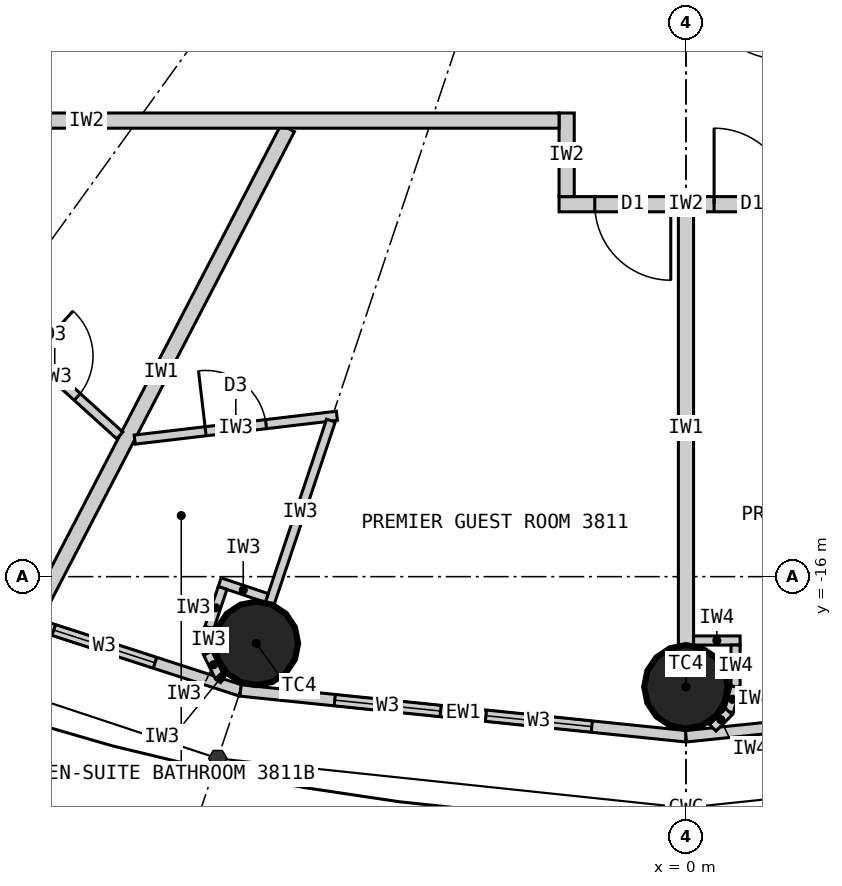
"""IFC4 building model, lengths in metres.
Left out: names, types, materials, properties, quantities, classifications, styles, units other than length and angle.
Written with IfcOpenShell. Run it as: python <this file> out.ifc"""

import sys

from ifc_helpers import new_model, si_unit, direction, frame, frame_2d, origin, origin_2d, place, context, subcontext, project, spatial, rectangle, circle, extrude, element, fill, save


model = new_model("IFC4")
c1 = context("Model", 3, precision=1e-05, world=origin(), true_north=direction((0.0, 1.0)))
c2 = subcontext(c1, "Body", "Model", "MODEL_VIEW")
j1 = project(units=[si_unit("LENGTHUNIT", "METRE"), si_unit("PLANEANGLEUNIT", "RADIAN")], contexts=[c1])
p1 = place(None, origin())
s1 = spatial("IfcSite", under=j1, at=p1, CompositionType="ELEMENT")
p2 = place(p1, origin())
s2 = spatial("IfcBuilding", under=s1, at=p2, CompositionType="ELEMENT")
p3 = place(p2, frame((0.0, 0.0, 146.7)))
s3 = spatial("IfcBuildingStorey", under=s2, at=p3, CompositionType="ELEMENT", Elevation=146.7)
for number, where, z_axis, x_axis in (
    (1, (-5.653, -16.877, 0.0), (0.0, 0.0, 1.0), (1.0, 0.0, 0.0)),
    (2, (0.0, -17.45, 0.0), (0.0, 0.0, 1.0), (1.0, 0.0, 0.0)),
):
    element("IfcColumn", number, at=place(p3, frame(where, z_axis=z_axis, x_axis=x_axis)), inside=s3, PredefinedType="COLUMN", context=c2, shape_type="SweptSolid", body=[
        extrude(circle(Radius=0.55, at=origin_2d()), origin(), (0.0, 0.0, 1.0), 3.3),
    ])
p4 = place(p3, frame((-11.346, -15.722, 0.0), z_axis=(0.0, 0.0, 1.0), x_axis=(0.951432482129, -0.307857486429, 0.0)))
e3 = element("IfcWall", 3, at=p4, inside=s3, PredefinedType="ELEMENTEDWALL", context=c2, shape_type="SweptSolid", body=[
    extrude(rectangle(XDim=5.766, YDim=0.15, at=frame_2d((2.883, 0.0))), origin(), (0.0, 0.0, 1.0), 3.12),
])
p5 = place(p4, frame((1.183, 0.0, 0.9)))
e4 = element("IfcOpeningElement", 4, at=p5, cuts=e3, PredefinedType="OPENING", context=c2, shape_type="SweptSolid", body=[
    extrude(rectangle(XDim=1.4, YDim=1.9, at=frame_2d((0.7, 0.95))), frame((0.0, 0.085, 0.0), z_axis=(0.0, -1.0, 0.0), x_axis=(1.0, 0.0, 0.0)), (0.0, 0.0, 1.0), 0.17),
])
p6 = place(p4, frame((3.183, 0.0, 0.9)))
e5 = element("IfcOpeningElement", 5, at=p6, cuts=e3, PredefinedType="OPENING", context=c2, shape_type="SweptSolid", body=[
    extrude(rectangle(XDim=1.4, YDim=1.9, at=frame_2d((0.7, 0.95))), frame((0.0, 0.085, 0.0), z_axis=(0.0, -1.0, 0.0), x_axis=(1.0, 0.0, 0.0)), (0.0, 0.0, 1.0), 0.17),
])
p7 = place(p3, frame((-5.86, -17.497, 0.0), z_axis=(0.0, 0.0, 1.0), x_axis=(0.994751738032, -0.102318032045, 0.0)))
e6 = element("IfcWall", 6, at=p7, inside=s3, PredefinedType="ELEMENTEDWALL", context=c2, shape_type="SweptSolid", body=[
    extrude(rectangle(XDim=5.891, YDim=0.15, at=frame_2d((2.946, 0.0))), origin(), (0.0, 0.0, 1.0), 3.12),
])
p8 = place(p7, frame((1.246, 0.0, 0.9)))
e7 = element("IfcOpeningElement", 7, at=p8, cuts=e6, PredefinedType="OPENING", context=c2, shape_type="SweptSolid", body=[
    extrude(rectangle(XDim=1.4, YDim=1.9, at=frame_2d((0.7, 0.95))), frame((0.0, 0.085, 0.0), z_axis=(0.0, -1.0, 0.0), x_axis=(1.0, 0.0, 0.0)), (0.0, 0.0, 1.0), 0.17),
])
p9 = place(p7, frame((3.246, 0.0, 0.9)))
e8 = element("IfcOpeningElement", 8, at=p9, cuts=e6, PredefinedType="OPENING", context=c2, shape_type="SweptSolid", body=[
    extrude(rectangle(XDim=1.4, YDim=1.9, at=frame_2d((0.7, 0.95))), frame((0.0, 0.085, 0.0), z_axis=(0.0, -1.0, 0.0), x_axis=(1.0, 0.0, 0.0)), (0.0, 0.0, 1.0), 0.17),
])
p10 = place(p3, frame((0.0, -18.1, 0.0), z_axis=(0.0, 0.0, 1.0), x_axis=(0.994751738032, 0.102318032045, 0.0)))
e9 = element("IfcWall", 9, at=p10, inside=s3, PredefinedType="ELEMENTEDWALL", context=c2, shape_type="SweptSolid", body=[
    extrude(rectangle(XDim=5.891, YDim=0.15, at=frame_2d((2.946, 0.0))), origin(), (0.0, 0.0, 1.0), 3.12),
])
p11 = place(p10, frame((1.246, 0.0, 0.9)))
e10 = element("IfcOpeningElement", 10, at=p11, cuts=e9, PredefinedType="OPENING", context=c2, shape_type="SweptSolid", body=[
    extrude(rectangle(XDim=1.4, YDim=1.9, at=frame_2d((0.7, 0.95))), frame((0.0, 0.085, 0.0), z_axis=(0.0, -1.0, 0.0), x_axis=(1.0, 0.0, 0.0)), (0.0, 0.0, 1.0), 0.17),
])
p12 = place(p10, frame((3.246, 0.0, 0.9)))
e11 = element("IfcOpeningElement", 11, at=p12, cuts=e9, PredefinedType="OPENING", context=c2, shape_type="SweptSolid", body=[
    extrude(rectangle(XDim=1.4, YDim=1.9, at=frame_2d((0.7, 0.95))), frame((0.0, 0.085, 0.0), z_axis=(0.0, -1.0, 0.0), x_axis=(1.0, 0.0, 0.0)), (0.0, 0.0, 1.0), 0.17),
])
p13 = place(p3, frame((-5.24, -10.1, 0.0), z_axis=(0.0, 0.0, 1.0), x_axis=(-0.460532965373, -0.887642601391, 0.0)))
e12 = element("IfcWall", 12, at=p13, inside=s3, PredefinedType="PARTITIONING", context=c2, shape_type="SweptSolid", body=[
    extrude(rectangle(XDim=7.231, YDim=0.2, at=frame_2d((3.616, 0.0))), origin(), (0.0, 0.0, 1.0), 3.12),
])
p14 = place(p3, frame((0.0, -11.2, 0.0), z_axis=(0.0, 0.0, 1.0), x_axis=(0.0, -1.0, 0.0)))
e13 = element("IfcWall", 13, at=p14, inside=s3, PredefinedType="PARTITIONING", context=c2, shape_type="SweptSolid", body=[
    extrude(rectangle(XDim=5.7, YDim=0.2, at=frame_2d((2.85, 0.0))), origin(), (0.0, 0.0, 1.0), 2.42),
])
p15 = place(p3, frame((1.67, -11.1, 0.0), z_axis=(0.0, 0.0, 1.0), x_axis=(-1.0, 0.0, 0.0)))
e14 = element("IfcWall", 14, at=p15, inside=s3, PredefinedType="PARTITIONING", context=c2, shape_type="SweptSolid", body=[
    extrude(rectangle(XDim=3.34, YDim=0.2, at=frame_2d((1.67, 0.0))), origin(), (0.0, 0.0, 1.0), 3.12),
])
p16 = place(p15, frame((1.87, 0.0, 0.0)))
e15 = element("IfcOpeningElement", 15, at=p16, cuts=e14, PredefinedType="OPENING", context=c2, shape_type="SweptSolid", body=[
    extrude(rectangle(XDim=1.0, YDim=2.2, at=frame_2d((0.5, 1.1))), frame((0.0, 0.11, 0.0), z_axis=(0.0, -1.0, 0.0), x_axis=(1.0, 0.0, 0.0)), (0.0, 0.0, 1.0), 0.22),
])
p17 = place(p15, frame((0.3, 0.0, 0.0)))
e16 = element("IfcOpeningElement", 16, at=p17, cuts=e14, PredefinedType="OPENING", context=c2, shape_type="SweptSolid", body=[
    extrude(rectangle(XDim=1.0, YDim=2.2, at=frame_2d((0.5, 1.1))), frame((0.0, 0.11, 0.0), z_axis=(0.0, -1.0, 0.0), x_axis=(1.0, 0.0, 0.0)), (0.0, 0.0, 1.0), 0.22),
])
p18 = place(p3, frame((-1.57, -9.9, 0.0), z_axis=(0.0, 0.0, 1.0), x_axis=(0.0, -1.0, 0.0)))
e17 = element("IfcWall", 17, at=p18, inside=s3, PredefinedType="PARTITIONING", context=c2, shape_type="SweptSolid", body=[
    extrude(rectangle(XDim=1.1, YDim=0.2, at=frame_2d((0.55, 0.0))), origin(), (0.0, 0.0, 1.0), 3.12),
])
p19 = place(p3, frame((-7.45, -14.142, 0.0), z_axis=(0.0, 0.0, 1.0), x_axis=(-0.74113984586, 0.671350675041, 0.0)))
e18 = element("IfcWall", 18, at=p19, inside=s3, PredefinedType="PARTITIONING", context=c2, shape_type="SweptSolid", body=[
    extrude(rectangle(XDim=2.309, YDim=0.12, at=frame_2d((1.154, 0.0))), origin(), (0.0, 0.0, 1.0), 3.12),
])
p20 = place(p19, frame((0.754, 0.0, 0.0)))
e19 = element("IfcOpeningElement", 19, at=p20, cuts=e18, PredefinedType="OPENING", context=c2, shape_type="SweptSolid", body=[
    extrude(rectangle(XDim=0.8, YDim=2.1, at=frame_2d((0.4, 1.05))), frame((0.0, 0.07, 0.0), z_axis=(0.0, -1.0, 0.0), x_axis=(1.0, 0.0, 0.0)), (0.0, 0.0, 1.0), 0.14),
])
p21 = place(p3, frame((-7.253, -14.197, 0.0), z_axis=(0.0, 0.0, 1.0), x_axis=(0.993128188393, 0.117031625725, 0.0)))
e20 = element("IfcWall", 20, at=p21, inside=s3, PredefinedType="PARTITIONING", context=c2, shape_type="SweptSolid", body=[
    extrude(rectangle(XDim=2.678, YDim=0.12, at=frame_2d((1.339, 0.0))), origin(), (0.0, 0.0, 1.0), 3.12),
])
p22 = place(p21, frame((0.939, 0.0, 0.0)))
e21 = element("IfcOpeningElement", 21, at=p22, cuts=e20, PredefinedType="OPENING", context=c2, shape_type="SweptSolid", body=[
    extrude(rectangle(XDim=0.8, YDim=2.1, at=frame_2d((0.4, 1.05))), frame((0.0, 0.07, 0.0), z_axis=(0.0, -1.0, 0.0), x_axis=(1.0, 0.0, 0.0)), (0.0, 0.0, 1.0), 0.14),
])
p23 = place(p3, frame((-4.671, -13.948, 0.0), z_axis=(0.0, 0.0, 1.0), x_axis=(-0.317669167093, -0.948201613729, 0.0)))
e22 = element("IfcWall", 22, at=p23, inside=s3, PredefinedType="PARTITIONING", context=c2, shape_type="SweptSolid", body=[
    extrude(rectangle(XDim=2.54, YDim=0.12, at=frame_2d((1.27, 0.0))), origin(), (0.0, 0.0, 1.0), 2.42),
])
p24 = place(p3, frame((-5.516, -16.28, 0.0), z_axis=(0.0, 0.0, 1.0), x_axis=(-0.948157944392, 0.317799484717, 0.0)))
e23 = element("IfcWall", 23, at=p24, inside=s3, PredefinedType="PARTITIONING", context=c2, shape_type="SweptSolid", body=[
    extrude(rectangle(XDim=0.652, YDim=0.12, at=frame_2d((0.326, 0.0))), origin(), (0.0, 0.0, 1.0), 3.12),
])
p25 = place(p3, frame((-6.097, -16.149, 0.0), z_axis=(0.0, 0.0, 1.0), x_axis=(-0.317292604854, -0.948327687514, 0.0)))
e24 = element("IfcWall", 24, at=p25, inside=s3, PredefinedType="PARTITIONING", context=c2, shape_type="SweptSolid", body=[
    extrude(rectangle(XDim=0.55, YDim=0.12, at=frame_2d((0.275, 0.0))), origin(), (0.0, 0.0, 1.0), 3.12),
])
for number, where, z_axis, x_axis in (
    (25, (-6.271, -16.67, 0.0), (0.0, 0.0, 1.0), (-0.061, -0.998, 0.0)),
    (26, (-6.292, -17.007, 0.0), (0.0, 0.0, 1.0), (0.445, -0.895, 0.0)),
):
    element("IfcWall", number, at=place(p3, frame(where, z_axis=z_axis, x_axis=x_axis)), inside=s3, PredefinedType="PARTITIONING", context=c2, shape_type="SweptSolid", body=[
        extrude(rectangle(XDim=0.338, YDim=0.12, at=frame_2d((0.169, 0.0))), origin(), (0.0, 0.0, 1.0), 3.12),
    ])
p26 = place(p3, frame((-6.142, -17.31, 0.0), z_axis=(0.0, 0.0, 1.0), x_axis=(0.835039693181, -0.550189704386, 0.0)))
e27 = element("IfcWall", 27, at=p26, inside=s3, PredefinedType="PARTITIONING", context=c2, shape_type="SweptSolid", body=[
    extrude(rectangle(XDim=0.062, YDim=0.12, at=frame_2d((0.031, 0.0))), origin(), (0.0, 0.0, 1.0), 3.12),
])
p27 = place(p3, frame((-1.67, -10.0, 0.0), z_axis=(0.0, 0.0, 1.0), x_axis=(-1.0, 0.0, 0.0)))
e28 = element("IfcWall", 28, at=p27, inside=s3, PredefinedType="PARTITIONING", context=c2, shape_type="SweptSolid", body=[
    extrude(rectangle(XDim=12.43, YDim=0.2, at=frame_2d((6.215, 0.0))), origin(), (0.0, 0.0, 1.0), 3.12),
])
p28 = place(p27, frame((9.655, 0.0, 0.0)))
e29 = element("IfcOpeningElement", 29, at=p28, cuts=e28, PredefinedType="OPENING", context=c2, shape_type="SweptSolid", body=[
    extrude(rectangle(XDim=1.0, YDim=2.2, at=frame_2d((0.5, 1.1))), frame((0.0, 0.11, 0.0), z_axis=(0.0, -1.0, 0.0), x_axis=(1.0, 0.0, 0.0)), (0.0, 0.0, 1.0), 0.22),
])
p29 = place(p3, frame((0.1, -16.84, 0.0), z_axis=(0.0, 0.0, 1.0), x_axis=(1.0, 0.0, 0.0)))
e30 = element("IfcWall", 30, at=p29, inside=s3, PredefinedType="PARTITIONING", context=c2, shape_type="SweptSolid", body=[
    extrude(rectangle(XDim=0.612, YDim=0.12, at=frame_2d((0.306, 0.0))), origin(), (0.0, 0.0, 1.0), 3.12),
])
p30 = place(p3, frame((0.652, -16.9, 0.0), z_axis=(0.0, 0.0, 1.0), x_axis=(0.0, -1.0, 0.0)))
e31 = element("IfcWall", 31, at=p30, inside=s3, PredefinedType="PARTITIONING", context=c2, shape_type="SweptSolid", body=[
    extrude(rectangle(XDim=0.55, YDim=0.12, at=frame_2d((0.275, 0.0))), origin(), (0.0, 0.0, 1.0), 3.12),
])
p31 = place(p3, frame((0.652, -17.45, 0.0), z_axis=(0.0, 0.0, 1.0), x_axis=(-0.258832454679, -0.965922233104, 0.0)))
e32 = element("IfcWall", 32, at=p31, inside=s3, PredefinedType="PARTITIONING", context=c2, shape_type="SweptSolid", body=[
    extrude(rectangle(XDim=0.338, YDim=0.12, at=frame_2d((0.169, 0.0))), origin(), (0.0, 0.0, 1.0), 3.12),
])
p32 = place(p3, frame((0.565, -17.776, 0.0), z_axis=(0.0, 0.0, 1.0), x_axis=(-0.707106781187, -0.707106781187, 0.0)))
e33 = element("IfcWall", 33, at=p32, inside=s3, PredefinedType="PARTITIONING", context=c2, shape_type="SweptSolid", body=[
    extrude(rectangle(XDim=0.301, YDim=0.12, at=frame_2d((0.15, 0.0))), origin(), (0.0, 0.0, 1.0), 3.12),
])
p33 = place(p6, origin())
e34 = element("IfcWindow", 34, at=p33, inside=s3, PartitioningType="SINGLE_PANEL", PredefinedType="WINDOW", context=c2, shape_type="SweptSolid", body=[
    extrude(rectangle(XDim=1.4, YDim=1.9, at=frame_2d((0.7, 0.95))), frame((0.0, 0.03, 0.0), z_axis=(0.0, -1.0, 0.0), x_axis=(1.0, 0.0, 0.0)), (0.0, 0.0, 1.0), 0.06),
])
fill(e5, e34)
p34 = place(p8, origin())
e35 = element("IfcWindow", 35, at=p34, inside=s3, PartitioningType="SINGLE_PANEL", PredefinedType="WINDOW", context=c2, shape_type="SweptSolid", body=[
    extrude(rectangle(XDim=1.4, YDim=1.9, at=frame_2d((0.7, 0.95))), frame((0.0, 0.03, 0.0), z_axis=(0.0, -1.0, 0.0), x_axis=(1.0, 0.0, 0.0)), (0.0, 0.0, 1.0), 0.06),
])
fill(e7, e35)
p35 = place(p9, origin())
e36 = element("IfcWindow", 36, at=p35, inside=s3, PartitioningType="SINGLE_PANEL", PredefinedType="WINDOW", context=c2, shape_type="SweptSolid", body=[
    extrude(rectangle(XDim=1.4, YDim=1.9, at=frame_2d((0.7, 0.95))), frame((0.0, 0.03, 0.0), z_axis=(0.0, -1.0, 0.0), x_axis=(1.0, 0.0, 0.0)), (0.0, 0.0, 1.0), 0.06),
])
fill(e8, e36)
p36 = place(p20, origin())
e37 = element("IfcDoor", 37, at=p36, inside=s3, OperationType="SINGLE_SWING_RIGHT", PredefinedType="DOOR", context=c2, shape_type="SweptSolid", body=[
    extrude(rectangle(XDim=0.8, YDim=2.1, at=frame_2d((0.4, 1.05))), frame((0.0, 0.025, 0.0), z_axis=(0.0, -1.0, 0.0), x_axis=(1.0, 0.0, 0.0)), (0.0, 0.0, 1.0), 0.05),
])
fill(e19, e37)
p37 = place(p22, origin())
e38 = element("IfcDoor", 38, at=p37, inside=s3, OperationType="SINGLE_SWING_LEFT", PredefinedType="DOOR", context=c2, shape_type="SweptSolid", body=[
    extrude(rectangle(XDim=0.8, YDim=2.1, at=frame_2d((0.4, 1.05))), frame((0.0, 0.025, 0.0), z_axis=(0.0, -1.0, 0.0), x_axis=(1.0, 0.0, 0.0)), (0.0, 0.0, 1.0), 0.05),
])
fill(e21, e38)
p38 = place(p16, origin())
e39 = element("IfcDoor", 39, at=p38, inside=s3, OperationType="SINGLE_SWING_LEFT", PredefinedType="DOOR", context=c2, shape_type="SweptSolid", body=[
    extrude(rectangle(XDim=1.0, YDim=2.2, at=frame_2d((0.5, 1.1))), frame((0.0, 0.025, 0.0), z_axis=(0.0, -1.0, 0.0), x_axis=(1.0, 0.0, 0.0)), (0.0, 0.0, 1.0), 0.05),
])
fill(e15, e39)
p39 = place(p17, origin())
e40 = element("IfcDoor", 40, at=p39, inside=s3, OperationType="SINGLE_SWING_RIGHT", PredefinedType="DOOR", context=c2, shape_type="SweptSolid", body=[
    extrude(rectangle(XDim=1.0, YDim=2.2, at=frame_2d((0.5, 1.1))), frame((0.0, 0.025, 0.0), z_axis=(0.0, -1.0, 0.0), x_axis=(1.0, 0.0, 0.0)), (0.0, 0.0, 1.0), 0.05),
])
fill(e16, e40)
save(model, sys.argv[1])
